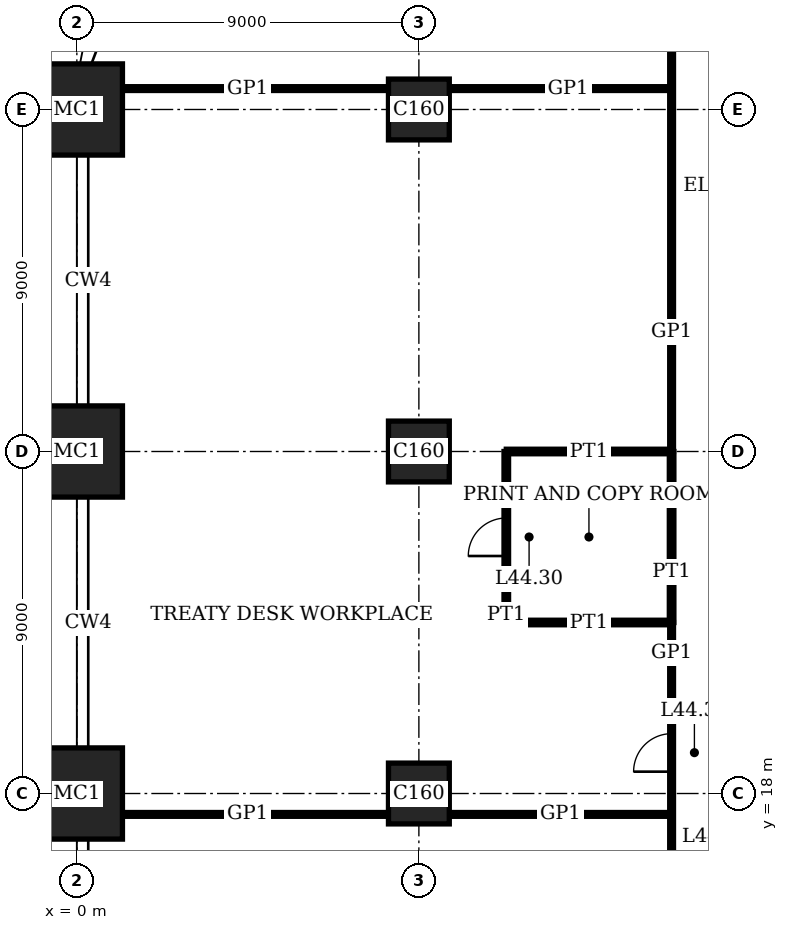
"""IFC4 building model, lengths in metres.
Left out: names, types, materials, properties, quantities, classifications, styles, units other than length and angle.
Written with IfcOpenShell. Run it as: python <this file> out.ifc"""

import sys

from ifc_helpers import new_model, si_unit, direction, frame, frame_2d, origin, origin_2d, place, context, subcontext, project, spatial, rectangle, extrude, element, fill, save


model = new_model("IFC4")
c1 = context("Model", 3, precision=1e-05, world=origin(), true_north=direction((0.0, 1.0)))
c2 = subcontext(c1, "Body", "Model", "MODEL_VIEW")
j1 = project(units=[si_unit("LENGTHUNIT", "METRE"), si_unit("PLANEANGLEUNIT", "RADIAN")], contexts=[c1])
p1 = place(None, origin())
s1 = spatial("IfcSite", under=j1, at=p1, CompositionType="ELEMENT")
p2 = place(p1, origin())
s2 = spatial("IfcBuilding", under=s1, at=p2, CompositionType="ELEMENT")
p3 = place(p2, frame((0.0, 0.0, 182.2)))
s3 = spatial("IfcBuildingStorey", under=s2, at=p3, CompositionType="ELEMENT", Elevation=182.2)
for number, where, z_axis, x_axis in (
    (1, (0.0, 18.0, 0.0), (0.0, 0.0, 1.0), (1.0, 0.0, 0.0)),
    (2, (0.0, 27.0, 0.0), (0.0, 0.0, 1.0), (1.0, 0.0, 0.0)),
    (3, (0.0, 36.0, 0.0), (0.0, 0.0, 1.0), (1.0, 0.0, 0.0)),
):
    element("IfcColumn", number, at=place(p3, frame(where, z_axis=z_axis, x_axis=x_axis)), inside=s3, PredefinedType="COLUMN", context=c2, shape_type="SweptSolid", body=[
        extrude(rectangle(XDim=2.4, YDim=2.4, at=origin_2d()), origin(), (0.0, 0.0, 1.0), 4.0),
    ])
for number, where, z_axis, x_axis in (
    (4, (9.0, 18.0, 0.0), (0.0, 0.0, 1.0), (1.0, 0.0, 0.0)),
    (5, (9.0, 27.0, 0.0), (0.0, 0.0, 1.0), (1.0, 0.0, 0.0)),
    (6, (9.0, 36.0, 0.0), (0.0, 0.0, 1.0), (1.0, 0.0, 0.0)),
):
    element("IfcColumn", number, at=place(p3, frame(where, z_axis=z_axis, x_axis=x_axis)), inside=s3, PredefinedType="COLUMN", context=c2, shape_type="SweptSolid", body=[
        extrude(rectangle(XDim=1.6, YDim=1.6, at=origin_2d()), origin(), (0.0, 0.0, 1.0), 4.0),
    ])
p4 = place(p3, frame((1.2, 17.45, 0.0), z_axis=(0.0, 0.0, 1.0), x_axis=(1.0, 0.0, 0.0)))
e7 = element("IfcWall", 7, at=p4, inside=s3, PredefinedType="PARTITIONING", context=c2, shape_type="SweptSolid", body=[
    extrude(rectangle(XDim=7.0, YDim=0.1, at=frame_2d((3.5, 0.0))), origin(), (0.0, 0.0, 1.0), 3.75),
])
p5 = place(p3, frame((9.8, 17.45, 0.0), z_axis=(0.0, 0.0, 1.0), x_axis=(1.0, 0.0, 0.0)))
e8 = element("IfcWall", 8, at=p5, inside=s3, PredefinedType="PARTITIONING", context=c2, shape_type="SweptSolid", body=[
    extrude(rectangle(XDim=5.85, YDim=0.1, at=frame_2d((2.925, 0.0))), origin(), (0.0, 0.0, 1.0), 3.75),
])
p6 = place(p3, frame((11.3, 22.5, 0.0), z_axis=(0.0, 0.0, 1.0), x_axis=(1.0, 0.0, 0.0)))
e9 = element("IfcWall", 9, at=p6, inside=s3, PredefinedType="PARTITIONING", context=c2, shape_type="SweptSolid", body=[
    extrude(rectangle(XDim=4.35, YDim=0.12, at=frame_2d((2.175, 0.0))), origin(), (0.0, 0.0, 1.0), 3.1),
])
p7 = place(p3, frame((11.3, 27.0, 0.0), z_axis=(0.0, 0.0, 1.0), x_axis=(1.0, 0.0, 0.0)))
e10 = element("IfcWall", 10, at=p7, inside=s3, PredefinedType="PARTITIONING", context=c2, shape_type="SweptSolid", body=[
    extrude(rectangle(XDim=4.35, YDim=0.12, at=frame_2d((2.175, 0.0))), origin(), (0.0, 0.0, 1.0), 3.05),
])
p8 = place(p3, frame((1.2, 36.55, 0.0), z_axis=(0.0, 0.0, 1.0), x_axis=(1.0, 0.0, 0.0)))
e11 = element("IfcWall", 11, at=p8, inside=s3, PredefinedType="PARTITIONING", context=c2, shape_type="SweptSolid", body=[
    extrude(rectangle(XDim=7.0, YDim=0.1, at=frame_2d((3.5, 0.0))), origin(), (0.0, 0.0, 1.0), 3.75),
])
p9 = place(p3, frame((9.8, 36.55, 0.0), z_axis=(0.0, 0.0, 1.0), x_axis=(1.0, 0.0, 0.0)))
e12 = element("IfcWall", 12, at=p9, inside=s3, PredefinedType="PARTITIONING", context=c2, shape_type="SweptSolid", body=[
    extrude(rectangle(XDim=5.85, YDim=0.1, at=frame_2d((2.925, 0.0))), origin(), (0.0, 0.0, 1.0), 3.75),
])
p10 = place(p3, frame((11.3, 22.5, 0.0), z_axis=(0.0, 0.0, 1.0), x_axis=(0.0, 1.0, 0.0)))
e13 = element("IfcWall", 13, at=p10, inside=s3, PredefinedType="PARTITIONING", context=c2, shape_type="SweptSolid", body=[
    extrude(rectangle(XDim=4.5, YDim=0.12, at=frame_2d((2.25, 0.0))), origin(), (0.0, 0.0, 1.0), 3.75),
])
p11 = place(p10, frame((1.75, 0.0, 0.0)))
e14 = element("IfcOpeningElement", 14, at=p11, cuts=e13, PredefinedType="OPENING", context=c2, shape_type="SweptSolid", body=[
    extrude(rectangle(XDim=1.0, YDim=2.4, at=frame_2d((0.5, 1.2))), frame((0.0, 0.07, 0.0), z_axis=(0.0, -1.0, 0.0), x_axis=(1.0, 0.0, 0.0)), (0.0, 0.0, 1.0), 0.14),
])
p12 = place(p3, frame((15.65, 22.5, 0.0), z_axis=(0.0, 0.0, 1.0), x_axis=(0.0, 1.0, 0.0)))
e15 = element("IfcWall", 15, at=p12, inside=s3, PredefinedType="PARTITIONING", context=c2, shape_type="SweptSolid", body=[
    extrude(rectangle(XDim=4.5, YDim=0.12, at=frame_2d((2.25, 0.0))), origin(), (0.0, 0.0, 1.0), 3.75),
])
p13 = place(p3, frame((15.65, 15.65, 0.0), z_axis=(0.0, 0.0, 1.0), x_axis=(0.0, 1.0, 0.0)))
e16 = element("IfcWall", 16, at=p13, inside=s3, PredefinedType="PARTITIONING", context=c2, shape_type="SweptSolid", body=[
    extrude(rectangle(XDim=6.85, YDim=0.1, at=frame_2d((3.425, 0.0))), origin(), (0.0, 0.0, 1.0), 3.75),
])
p14 = place(p13, frame((2.925, 0.0, 0.0)))
e17 = element("IfcOpeningElement", 17, at=p14, cuts=e16, PredefinedType="OPENING", context=c2, shape_type="SweptSolid", body=[
    extrude(rectangle(XDim=1.0, YDim=2.4, at=frame_2d((0.5, 1.2))), frame((0.0, 0.06, 0.0), z_axis=(0.0, -1.0, 0.0), x_axis=(1.0, 0.0, 0.0)), (0.0, 0.0, 1.0), 0.12),
])
p15 = place(p3, frame((15.65, 27.0, 0.0), z_axis=(0.0, 0.0, 1.0), x_axis=(0.0, 1.0, 0.0)))
e18 = element("IfcWall", 18, at=p15, inside=s3, PredefinedType="PARTITIONING", context=c2, shape_type="SweptSolid", body=[
    extrude(rectangle(XDim=11.35, YDim=0.1, at=frame_2d((5.675, 0.0))), origin(), (0.0, 0.0, 1.0), 3.75),
])
p16 = place(p11, origin())
e19 = element("IfcDoor", 19, at=p16, inside=s3, OperationType="SINGLE_SWING_RIGHT", PredefinedType="DOOR", context=c2, shape_type="SweptSolid", body=[
    extrude(rectangle(XDim=1.0, YDim=2.4, at=frame_2d((0.5, 1.2))), frame((0.0, 0.025, 0.0), z_axis=(0.0, -1.0, 0.0), x_axis=(1.0, 0.0, 0.0)), (0.0, 0.0, 1.0), 0.05),
])
fill(e14, e19)
p17 = place(p14, origin())
e20 = element("IfcDoor", 20, at=p17, inside=s3, OperationType="SINGLE_SWING_RIGHT", PredefinedType="DOOR", context=c2, shape_type="SweptSolid", body=[
    extrude(rectangle(XDim=1.0, YDim=2.4, at=frame_2d((0.5, 1.2))), frame((0.0, 0.02, 0.0), z_axis=(0.0, -1.0, 0.0), x_axis=(1.0, 0.0, 0.0)), (0.0, 0.0, 1.0), 0.04),
])
fill(e17, e20)
save(model, sys.argv[1])
